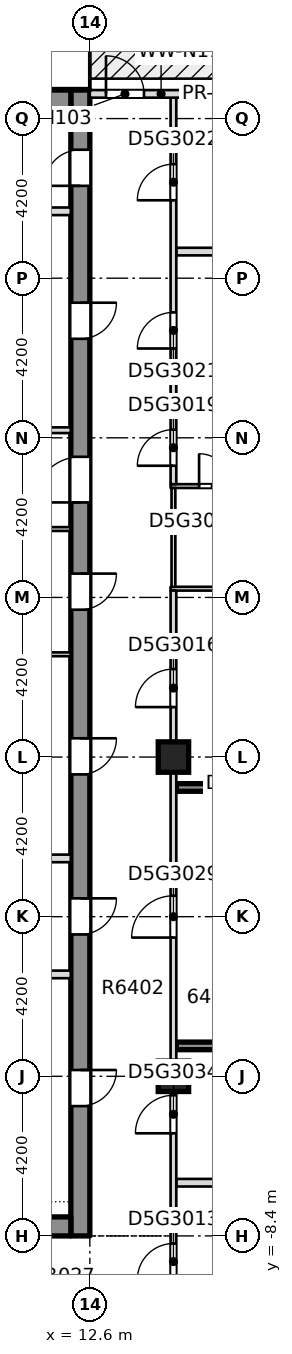
"""IFC4 building model, lengths in metres.
Left out: names, types, materials, properties, quantities, classifications, styles, units other than length and angle.
Written with IfcOpenShell. Run it as: python <this file> out.ifc"""

import sys

from ifc_helpers import new_model, si_unit, direction, frame, frame_2d, origin, origin_2d, place, context, subcontext, project, spatial, rectangle, extrude, element, fill, save


model = new_model("IFC4")
c1 = context("Model", 3, precision=1e-05, world=origin(), true_north=direction((0.0, 1.0)))
c2 = subcontext(c1, "Body", "Model", "MODEL_VIEW")
j1 = project(units=[si_unit("LENGTHUNIT", "METRE"), si_unit("PLANEANGLEUNIT", "RADIAN")], contexts=[c1])
p1 = place(None, origin())
s1 = spatial("IfcSite", under=j1, at=p1, CompositionType="ELEMENT")
p2 = place(p1, origin())
s2 = spatial("IfcBuilding", under=s1, at=p2, CompositionType="ELEMENT")
p3 = place(p2, frame((0.0, 0.0, 244.15)))
s3 = spatial("IfcBuildingStorey", under=s2, at=p3, CompositionType="ELEMENT", Elevation=244.15)
p4 = place(p3, frame((12.35, -8.4, -0.4), z_axis=(0.0, 0.0, 1.0), x_axis=(0.0, 1.0, 0.0)))
e1 = element("IfcWall", 1, at=p4, inside=s3, PredefinedType="SHEAR", context=c2, shape_type="SweptSolid", body=[
    extrude(rectangle(XDim=30.15, YDim=0.5, at=frame_2d((15.075, 0.0))), origin(), (0.0, 0.0, 1.0), 3.45),
])
p5 = place(p4, frame((3.416, 0.0, 0.4)))
e2 = element("IfcOpeningElement", 2, at=p5, cuts=e1, PredefinedType="OPENING", context=c2, shape_type="SweptSolid", body=[
    extrude(rectangle(XDim=0.95, YDim=2.1, at=frame_2d((0.475, 1.05))), frame((0.0, 0.26, 0.0), z_axis=(0.0, -1.0, 0.0), x_axis=(1.0, 0.0, 0.0)), (0.0, 0.0, 1.0), 0.52),
])
p6 = place(p4, frame((7.932, 0.0, 0.4)))
e3 = element("IfcOpeningElement", 3, at=p6, cuts=e1, PredefinedType="OPENING", context=c2, shape_type="SweptSolid", body=[
    extrude(rectangle(XDim=0.95, YDim=2.1, at=frame_2d((0.475, 1.05))), frame((0.0, 0.26, 0.0), z_axis=(0.0, -1.0, 0.0), x_axis=(1.0, 0.0, 0.0)), (0.0, 0.0, 1.0), 0.52),
])
p7 = place(p4, frame((12.144, 0.0, 0.4)))
e4 = element("IfcOpeningElement", 4, at=p7, cuts=e1, PredefinedType="OPENING", context=c2, shape_type="SweptSolid", body=[
    extrude(rectangle(XDim=0.95, YDim=2.1, at=frame_2d((0.475, 1.05))), frame((0.0, 0.26, 0.0), z_axis=(0.0, -1.0, 0.0), x_axis=(1.0, 0.0, 0.0)), (0.0, 0.0, 1.0), 0.52),
])
p8 = place(p4, frame((16.477, 0.0, 0.4)))
e5 = element("IfcOpeningElement", 5, at=p8, cuts=e1, PredefinedType="OPENING", context=c2, shape_type="SweptSolid", body=[
    extrude(rectangle(XDim=0.95, YDim=2.1, at=frame_2d((0.475, 1.05))), frame((0.0, 0.26, 0.0), z_axis=(0.0, -1.0, 0.0), x_axis=(1.0, 0.0, 0.0)), (0.0, 0.0, 1.0), 0.52),
])
p9 = place(p4, frame((23.605, 0.0, 0.4)))
e6 = element("IfcOpeningElement", 6, at=p9, cuts=e1, PredefinedType="OPENING", context=c2, shape_type="SweptSolid", body=[
    extrude(rectangle(XDim=0.95, YDim=2.1, at=frame_2d((0.475, 1.05))), frame((0.0, 0.26, 0.0), z_axis=(0.0, -1.0, 0.0), x_axis=(1.0, 0.0, 0.0)), (0.0, 0.0, 1.0), 0.52),
])
p10 = place(p4, frame((27.63, 0.0, 0.4)))
e7 = element("IfcOpeningElement", 7, at=p10, cuts=e1, PredefinedType="OPENING", context=c2, shape_type="SweptSolid", body=[
    extrude(rectangle(XDim=0.95, YDim=2.1, at=frame_2d((0.475, 1.05))), frame((0.0, 0.26, 0.0), z_axis=(0.0, -1.0, 0.0), x_axis=(1.0, 0.0, 0.0)), (0.0, 0.0, 1.0), 0.52),
])
p11 = place(p4, frame((19.3, 0.0, 0.4)))
e8 = element("IfcOpeningElement", 8, at=p11, cuts=e1, PredefinedType="OPENING", context=c2, shape_type="SweptSolid", body=[
    extrude(rectangle(XDim=1.2, YDim=2.1, at=frame_2d((0.6, 1.05))), frame((0.0, 0.26, 0.0), z_axis=(0.0, -1.0, 0.0), x_axis=(1.0, 0.0, 0.0)), (0.0, 0.0, 1.0), 0.52),
])
p12 = place(p3, frame((-12.1, -8.15, -0.4), z_axis=(0.0, 0.0, 1.0), x_axis=(1.0, 0.0, 0.0)))
e9 = element("IfcWall", 9, at=p12, inside=s3, PredefinedType="SHEAR", context=c2, shape_type="SweptSolid", body=[
    extrude(rectangle(XDim=24.2, YDim=0.5, at=frame_2d((12.1, 0.0))), origin(), (0.0, 0.0, 1.0), 3.45),
])
p13 = place(p12, frame((7.35, 0.0, 0.4)))
e10 = element("IfcOpeningElement", 10, at=p13, cuts=e9, PredefinedType="OPENING", context=c2, shape_type="SweptSolid", body=[
    extrude(rectangle(XDim=1.8, YDim=2.1, at=frame_2d((0.9, 1.05))), frame((0.0, 0.26, 0.0), z_axis=(0.0, -1.0, 0.0), x_axis=(1.0, 0.0, 0.0)), (0.0, 0.0, 1.0), 0.52),
])
p14 = place(p12, frame((15.05, 0.0, 0.4)))
e11 = element("IfcOpeningElement", 11, at=p14, cuts=e9, PredefinedType="OPENING", context=c2, shape_type="SweptSolid", body=[
    extrude(rectangle(XDim=1.8, YDim=2.1, at=frame_2d((0.9, 1.05))), frame((0.0, 0.26, 0.0), z_axis=(0.0, -1.0, 0.0), x_axis=(1.0, 0.0, 0.0)), (0.0, 0.0, 1.0), 0.52),
])
p15 = place(p3, frame((-12.1, 21.5, -0.4), z_axis=(0.0, 0.0, 1.0), x_axis=(1.0, 0.0, 0.0)))
e12 = element("IfcWall", 12, at=p15, inside=s3, PredefinedType="SHEAR", context=c2, shape_type="SweptSolid", body=[
    extrude(rectangle(XDim=24.2, YDim=0.5, at=frame_2d((12.1, 0.0))), origin(), (0.0, 0.0, 1.0), 3.45),
])
for number, where, z_axis, x_axis in (
    (13, (14.8, -4.2, -0.4), (0.0, 0.0, 1.0), (1.0, 0.0, 0.0)),
    (14, (14.8, 4.2, -0.4), (0.0, 0.0, 1.0), (1.0, 0.0, 0.0)),
):
    element("IfcColumn", number, at=place(p3, frame(where, z_axis=z_axis, x_axis=x_axis)), inside=s3, PredefinedType="COLUMN", context=c2, shape_type="SweptSolid", body=[
        extrude(rectangle(XDim=0.8, YDim=0.8, at=origin_2d()), origin(), (0.0, 0.0, 1.0), 3.45),
    ])
p16 = place(p3, frame((14.875, -7.0, 0.0), z_axis=(0.0, 0.0, 1.0), x_axis=(1.0, 0.0, 0.0)))
e15 = element("IfcWall", 15, at=p16, inside=s3, PredefinedType="PARTITIONING", context=c2, shape_type="SweptSolid", body=[
    extrude(rectangle(XDim=10.875, YDim=0.2, at=frame_2d((5.438, 0.0))), origin(), (0.0, 0.0, 1.0), 3.05),
])
p17 = place(p3, frame((14.875, -3.4, 0.0), z_axis=(0.0, 0.0, 1.0), x_axis=(1.0, 0.0, 0.0)))
e16 = element("IfcWall", 16, at=p17, inside=s3, PredefinedType="SOLIDWALL", context=c2, shape_type="SweptSolid", body=[
    extrude(rectangle(XDim=5.525, YDim=0.2, at=frame_2d((2.762, 0.0))), origin(), (0.0, 0.0, 1.0), 3.05),
])
p18 = place(p3, frame((14.875, 3.4, 0.0), z_axis=(0.0, 0.0, 1.0), x_axis=(1.0, 0.0, 0.0)))
e17 = element("IfcWall", 17, at=p18, inside=s3, PredefinedType="SOLIDWALL", context=c2, shape_type="SweptSolid", body=[
    extrude(rectangle(XDim=5.575, YDim=0.2, at=frame_2d((2.788, 0.0))), origin(), (0.0, 0.0, 1.0), 3.05),
])
p19 = place(p3, frame((14.725, 8.63, 0.0), z_axis=(0.0, 0.0, 1.0), x_axis=(1.0, 0.0, 0.0)))
e18 = element("IfcWall", 18, at=p19, inside=s3, PredefinedType="PARTITIONING", context=c2, shape_type="SweptSolid", body=[
    extrude(rectangle(XDim=2.825, YDim=0.1, at=frame_2d((1.413, 0.0))), origin(), (0.0, 0.0, 1.0), 3.05),
])
p20 = place(p3, frame((14.725, 11.33, 0.0), z_axis=(0.0, 0.0, 1.0), x_axis=(1.0, 0.0, 0.0)))
e19 = element("IfcWall", 19, at=p20, inside=s3, PredefinedType="PARTITIONING", context=c2, shape_type="SweptSolid", body=[
    extrude(rectangle(XDim=2.825, YDim=0.1, at=frame_2d((1.413, 0.0))), origin(), (0.0, 0.0, 1.0), 3.05),
])
p21 = place(p20, frame((0.75, 0.0, 0.0)))
e20 = element("IfcOpeningElement", 20, at=p21, cuts=e19, PredefinedType="OPENING", context=c2, shape_type="SweptSolid", body=[
    extrude(rectangle(XDim=0.85, YDim=2.1, at=frame_2d((0.425, 1.05))), frame((0.0, 0.06, 0.0), z_axis=(0.0, -1.0, 0.0), x_axis=(1.0, 0.0, 0.0)), (0.0, 0.0, 1.0), 0.12),
])
for number, where, z_axis, x_axis in (
    (21, (14.875, 13.35, 0.0), (0.0, 0.0, 1.0), (1.0, 0.0, 0.0)),
    (22, (14.875, 17.5, 0.0), (0.0, 0.0, 1.0), (1.0, 0.0, 0.0)),
):
    element("IfcWall", number, at=place(p3, frame(where, z_axis=z_axis, x_axis=x_axis)), inside=s3, PredefinedType="PARTITIONING", context=c2, shape_type="SweptSolid", body=[
        extrude(rectangle(XDim=2.475, YDim=0.2, at=frame_2d((1.238, 0.0))), origin(), (0.0, 0.0, 1.0), 3.05),
    ])
p22 = place(p3, frame((14.8, -10.45, 0.0), z_axis=(0.0, 0.0, 1.0), x_axis=(0.0, 1.0, 0.0)))
e23 = element("IfcWall", 23, at=p22, inside=s3, PredefinedType="PARTITIONING", context=c2, shape_type="SweptSolid", body=[
    extrude(rectangle(XDim=19.03, YDim=0.15, at=frame_2d((9.515, 0.0))), origin(), (0.0, 0.0, 1.0), 3.05),
])
p23 = place(p22, frame((0.9, 0.0, 0.0)))
e24 = element("IfcOpeningElement", 24, at=p23, cuts=e23, PredefinedType="OPENING", context=c2, shape_type="SweptSolid", body=[
    extrude(rectangle(XDim=0.95, YDim=2.1, at=frame_2d((0.475, 1.05))), frame((0.0, 0.085, 0.0), z_axis=(0.0, -1.0, 0.0), x_axis=(1.0, 0.0, 0.0)), (0.0, 0.0, 1.0), 0.17),
])
p24 = place(p22, frame((15.965, 0.0, 0.0)))
e25 = element("IfcOpeningElement", 25, at=p24, cuts=e23, PredefinedType="OPENING", context=c2, shape_type="SweptSolid", body=[
    extrude(rectangle(XDim=1.0, YDim=2.1, at=frame_2d((0.5, 1.05))), frame((0.0, 0.085, 0.0), z_axis=(0.0, -1.0, 0.0), x_axis=(1.0, 0.0, 0.0)), (0.0, 0.0, 1.0), 0.17),
])
p25 = place(p22, frame((9.9, 0.0, 0.0)))
e26 = element("IfcOpeningElement", 26, at=p25, cuts=e23, PredefinedType="OPENING", context=c2, shape_type="SweptSolid", body=[
    extrude(rectangle(XDim=1.1, YDim=2.1, at=frame_2d((0.55, 1.05))), frame((0.0, 0.085, 0.0), z_axis=(0.0, -1.0, 0.0), x_axis=(1.0, 0.0, 0.0)), (0.0, 0.0, 1.0), 0.17),
])
p26 = place(p22, frame((4.75, 0.0, 0.0)))
e27 = element("IfcOpeningElement", 27, at=p26, cuts=e23, PredefinedType="OPENING", context=c2, shape_type="SweptSolid", body=[
    extrude(rectangle(XDim=1.0, YDim=2.1, at=frame_2d((0.5, 1.05))), frame((0.0, 0.085, 0.0), z_axis=(0.0, -1.0, 0.0), x_axis=(1.0, 0.0, 0.0)), (0.0, 0.0, 1.0), 0.17),
])
p27 = place(p3, frame((14.8, 8.68, 0.0), z_axis=(0.0, 0.0, 1.0), x_axis=(0.0, 1.0, 0.0)))
e28 = element("IfcWall", 28, at=p27, inside=s3, PredefinedType="PARTITIONING", context=c2, shape_type="SweptSolid", body=[
    extrude(rectangle(XDim=2.6, YDim=0.1, at=frame_2d((1.3, 0.0))), origin(), (0.0, 0.0, 1.0), 3.05),
])
p28 = place(p3, frame((14.8, 11.38, 0.0), z_axis=(0.0, 0.0, 1.0), x_axis=(0.0, 1.0, 0.0)))
e29 = element("IfcWall", 29, at=p28, inside=s3, PredefinedType="PARTITIONING", context=c2, shape_type="SweptSolid", body=[
    extrude(rectangle(XDim=10.17, YDim=0.15, at=frame_2d((5.085, 0.0))), origin(), (0.0, 0.0, 1.0), 3.05),
])
p29 = place(p28, frame((0.485, 0.0, 0.0)))
e30 = element("IfcOpeningElement", 30, at=p29, cuts=e29, PredefinedType="OPENING", context=c2, shape_type="SweptSolid", body=[
    extrude(rectangle(XDim=0.95, YDim=2.1, at=frame_2d((0.475, 1.05))), frame((0.0, 0.085, 0.0), z_axis=(0.0, -1.0, 0.0), x_axis=(1.0, 0.0, 0.0)), (0.0, 0.0, 1.0), 0.17),
])
p30 = place(p28, frame((3.57, 0.0, 0.0)))
e31 = element("IfcOpeningElement", 31, at=p30, cuts=e29, PredefinedType="OPENING", context=c2, shape_type="SweptSolid", body=[
    extrude(rectangle(XDim=0.95, YDim=2.1, at=frame_2d((0.475, 1.05))), frame((0.0, 0.085, 0.0), z_axis=(0.0, -1.0, 0.0), x_axis=(1.0, 0.0, 0.0)), (0.0, 0.0, 1.0), 0.17),
])
p31 = place(p28, frame((7.47, 0.0, 0.0)))
e32 = element("IfcOpeningElement", 32, at=p31, cuts=e29, PredefinedType="OPENING", context=c2, shape_type="SweptSolid", body=[
    extrude(rectangle(XDim=0.95, YDim=2.1, at=frame_2d((0.475, 1.05))), frame((0.0, 0.085, 0.0), z_axis=(0.0, -1.0, 0.0), x_axis=(1.0, 0.0, 0.0)), (0.0, 0.0, 1.0), 0.17),
])
p32 = place(p3, frame((16.35, 21.65, 0.0), z_axis=(0.0, 0.0, 1.0), x_axis=(-1.0, 0.0, 0.0)))
e33 = element("IfcWall", 33, at=p32, inside=s3, PredefinedType="STANDARD", context=c2, shape_type="SweptSolid", body=[
    extrude(rectangle(XDim=3.75, YDim=0.2, at=frame_2d((1.875, 0.0))), origin(), (0.0, 0.0, 1.0), 3.05),
])
p33 = place(p32, frame((2.325, 0.0, 0.0)))
e34 = element("IfcOpeningElement", 34, at=p33, cuts=e33, PredefinedType="OPENING", context=c2, shape_type="SweptSolid", body=[
    extrude(rectangle(XDim=1.0, YDim=2.4, at=frame_2d((0.5, 1.2))), frame((0.0, 0.11, 0.0), z_axis=(0.0, -1.0, 0.0), x_axis=(1.0, 0.0, 0.0)), (0.0, 0.0, 1.0), 0.22),
])
for number, where, z_axis, x_axis in (
    (35, (8.651, -1.519, 0.0), (0.0, 0.0, 1.0), (1.0, 0.0, 0.0)),
    (36, (8.651, 1.533, 0.0), (0.0, 0.0, 1.0), (1.0, 0.0, 0.0)),
):
    element("IfcWall", number, at=place(p3, frame(where, z_axis=z_axis, x_axis=x_axis)), inside=s3, PredefinedType="PARTITIONING", context=c2, shape_type="SweptSolid", body=[
        extrude(rectangle(XDim=3.448, YDim=0.2, at=frame_2d((1.724, 0.0))), origin(), (0.0, 0.0, 1.0), 3.05),
    ])
for number, where, z_axis, x_axis in (
    (37, (8.651, 6.904, 0.0), (0.0, 0.0, 1.0), (1.0, 0.0, 0.0)),
    (38, (8.651, 10.2, 0.0), (0.0, 0.0, 1.0), (1.0, 0.0, 0.0)),
):
    element("IfcWall", number, at=place(p3, frame(where, z_axis=z_axis, x_axis=x_axis)), inside=s3, PredefinedType="PARTITIONING", context=c2, shape_type="SweptSolid", body=[
        extrude(rectangle(XDim=3.448, YDim=0.1, at=frame_2d((1.724, 0.0))), origin(), (0.0, 0.0, 1.0), 3.05),
    ])
p34 = place(p3, frame((8.651, 12.8, 0.0), z_axis=(0.0, 0.0, 1.0), x_axis=(1.0, 0.0, 0.0)))
e39 = element("IfcWall", 39, at=p34, inside=s3, PredefinedType="PARTITIONING", context=c2, shape_type="SweptSolid", body=[
    extrude(rectangle(XDim=3.448, YDim=0.15, at=frame_2d((1.724, 0.0))), origin(), (0.0, 0.0, 1.0), 3.05),
])
p35 = place(p3, frame((8.651, 18.56, 0.0), z_axis=(0.0, 0.0, 1.0), x_axis=(1.0, 0.0, 0.0)))
e40 = element("IfcWall", 40, at=p35, inside=s3, PredefinedType="PARTITIONING", context=c2, shape_type="SweptSolid", body=[
    extrude(rectangle(XDim=3.448, YDim=0.2, at=frame_2d((1.724, 0.0))), origin(), (0.0, 0.0, 1.0), 3.05),
])
p36 = place(p23, origin())
e41 = element("IfcDoor", 41, at=p36, inside=s3, OperationType="SINGLE_SWING_RIGHT", PredefinedType="DOOR", context=c2, shape_type="SweptSolid", body=[
    extrude(rectangle(XDim=0.95, YDim=2.1, at=frame_2d((0.475, 1.05))), frame((0.0, 0.025, 0.0), z_axis=(0.0, -1.0, 0.0), x_axis=(1.0, 0.0, 0.0)), (0.0, 0.0, 1.0), 0.05),
])
fill(e24, e41)
p37 = place(p24, origin())
e42 = element("IfcDoor", 42, at=p37, inside=s3, OperationType="SINGLE_SWING_LEFT", PredefinedType="DOOR", context=c2, shape_type="SweptSolid", body=[
    extrude(rectangle(XDim=1.0, YDim=2.1, at=frame_2d((0.5, 1.05))), frame((0.0, 0.025, 0.0), z_axis=(0.0, -1.0, 0.0), x_axis=(1.0, 0.0, 0.0)), (0.0, 0.0, 1.0), 0.05),
])
fill(e25, e42)
p38 = place(p29, origin())
e43 = element("IfcDoor", 43, at=p38, inside=s3, OperationType="SINGLE_SWING_RIGHT", PredefinedType="DOOR", context=c2, shape_type="SweptSolid", body=[
    extrude(rectangle(XDim=0.95, YDim=2.1, at=frame_2d((0.475, 1.05))), frame((0.0, 0.025, 0.0), z_axis=(0.0, -1.0, 0.0), x_axis=(1.0, 0.0, 0.0)), (0.0, 0.0, 1.0), 0.05),
])
fill(e30, e43)
p39 = place(p21, origin())
e44 = element("IfcDoor", 44, at=p39, inside=s3, OperationType="SINGLE_SWING_RIGHT", PredefinedType="DOOR", context=c2, shape_type="SweptSolid", body=[
    extrude(rectangle(XDim=0.85, YDim=2.1, at=frame_2d((0.425, 1.05))), frame((0.0, 0.025, 0.0), z_axis=(0.0, -1.0, 0.0), x_axis=(1.0, 0.0, 0.0)), (0.0, 0.0, 1.0), 0.05),
])
fill(e20, e44)
p40 = place(p30, origin())
e45 = element("IfcDoor", 45, at=p40, inside=s3, OperationType="SINGLE_SWING_RIGHT", PredefinedType="DOOR", context=c2, shape_type="SweptSolid", body=[
    extrude(rectangle(XDim=0.95, YDim=2.1, at=frame_2d((0.475, 1.05))), frame((0.0, 0.025, 0.0), z_axis=(0.0, -1.0, 0.0), x_axis=(1.0, 0.0, 0.0)), (0.0, 0.0, 1.0), 0.05),
])
fill(e31, e45)
p41 = place(p31, origin())
e46 = element("IfcDoor", 46, at=p41, inside=s3, OperationType="SINGLE_SWING_RIGHT", PredefinedType="DOOR", context=c2, shape_type="SweptSolid", body=[
    extrude(rectangle(XDim=0.95, YDim=2.1, at=frame_2d((0.475, 1.05))), frame((0.0, 0.025, 0.0), z_axis=(0.0, -1.0, 0.0), x_axis=(1.0, 0.0, 0.0)), (0.0, 0.0, 1.0), 0.05),
])
fill(e32, e46)
p42 = place(p25, origin())
e47 = element("IfcDoor", 47, at=p42, inside=s3, OperationType="SINGLE_SWING_LEFT", PredefinedType="DOOR", context=c2, shape_type="SweptSolid", body=[
    extrude(rectangle(XDim=1.1, YDim=2.1, at=frame_2d((0.55, 1.05))), frame((0.0, 0.025, 0.0), z_axis=(0.0, -1.0, 0.0), x_axis=(1.0, 0.0, 0.0)), (0.0, 0.0, 1.0), 0.05),
])
fill(e26, e47)
p43 = place(p26, origin())
e48 = element("IfcDoor", 48, at=p43, inside=s3, OperationType="SINGLE_SWING_RIGHT", PredefinedType="DOOR", context=c2, shape_type="SweptSolid", body=[
    extrude(rectangle(XDim=1.0, YDim=2.1, at=frame_2d((0.5, 1.05))), frame((0.0, 0.025, 0.0), z_axis=(0.0, -1.0, 0.0), x_axis=(1.0, 0.0, 0.0)), (0.0, 0.0, 1.0), 0.05),
])
fill(e27, e48)
p44 = place(p33, origin())
e49 = element("IfcDoor", 49, at=p44, inside=s3, OperationType="SINGLE_SWING_LEFT", PredefinedType="DOOR", context=c2, shape_type="SweptSolid", body=[
    extrude(rectangle(XDim=1.0, YDim=2.4, at=frame_2d((0.5, 1.2))), frame((0.0, 0.025, 0.0), z_axis=(0.0, -1.0, 0.0), x_axis=(1.0, 0.0, 0.0)), (0.0, 0.0, 1.0), 0.05),
])
fill(e34, e49)
p45 = place(p5, origin())
e50 = element("IfcDoor", 50, at=p45, inside=s3, OperationType="SINGLE_SWING_LEFT", PredefinedType="DOOR", context=c2, shape_type="SweptSolid", body=[
    extrude(rectangle(XDim=0.95, YDim=2.1, at=frame_2d((0.475, 1.05))), frame((0.0, 0.025, 0.0), z_axis=(0.0, -1.0, 0.0), x_axis=(1.0, 0.0, 0.0)), (0.0, 0.0, 1.0), 0.05),
])
fill(e2, e50)
p46 = place(p6, origin())
e51 = element("IfcDoor", 51, at=p46, inside=s3, OperationType="SINGLE_SWING_LEFT", PredefinedType="DOOR", context=c2, shape_type="SweptSolid", body=[
    extrude(rectangle(XDim=0.95, YDim=2.1, at=frame_2d((0.475, 1.05))), frame((0.0, 0.025, 0.0), z_axis=(0.0, -1.0, 0.0), x_axis=(1.0, 0.0, 0.0)), (0.0, 0.0, 1.0), 0.05),
])
fill(e3, e51)
p47 = place(p7, origin())
e52 = element("IfcDoor", 52, at=p47, inside=s3, OperationType="SINGLE_SWING_LEFT", PredefinedType="DOOR", context=c2, shape_type="SweptSolid", body=[
    extrude(rectangle(XDim=0.95, YDim=2.1, at=frame_2d((0.475, 1.05))), frame((0.0, 0.025, 0.0), z_axis=(0.0, -1.0, 0.0), x_axis=(1.0, 0.0, 0.0)), (0.0, 0.0, 1.0), 0.05),
])
fill(e4, e52)
p48 = place(p8, origin())
e53 = element("IfcDoor", 53, at=p48, inside=s3, OperationType="SINGLE_SWING_LEFT", PredefinedType="DOOR", context=c2, shape_type="SweptSolid", body=[
    extrude(rectangle(XDim=0.95, YDim=2.1, at=frame_2d((0.475, 1.05))), frame((0.0, 0.025, 0.0), z_axis=(0.0, -1.0, 0.0), x_axis=(1.0, 0.0, 0.0)), (0.0, 0.0, 1.0), 0.05),
])
fill(e5, e53)
p49 = place(p9, origin())
e54 = element("IfcDoor", 54, at=p49, inside=s3, OperationType="SINGLE_SWING_LEFT", PredefinedType="DOOR", context=c2, shape_type="SweptSolid", body=[
    extrude(rectangle(XDim=0.95, YDim=2.1, at=frame_2d((0.475, 1.05))), frame((0.0, 0.025, 0.0), z_axis=(0.0, -1.0, 0.0), x_axis=(1.0, 0.0, 0.0)), (0.0, 0.0, 1.0), 0.05),
])
fill(e6, e54)
p50 = place(p10, origin())
e55 = element("IfcDoor", 55, at=p50, inside=s3, OperationType="SINGLE_SWING_LEFT", PredefinedType="DOOR", context=c2, shape_type="SweptSolid", body=[
    extrude(rectangle(XDim=0.95, YDim=2.1, at=frame_2d((0.475, 1.05))), frame((0.0, 0.025, 0.0), z_axis=(0.0, -1.0, 0.0), x_axis=(1.0, 0.0, 0.0)), (0.0, 0.0, 1.0), 0.05),
])
fill(e7, e55)
p51 = place(p11, origin())
e56 = element("IfcDoor", 56, at=p51, inside=s3, OperationType="SINGLE_SWING_LEFT", PredefinedType="DOOR", context=c2, shape_type="SweptSolid", body=[
    extrude(rectangle(XDim=1.2, YDim=2.1, at=frame_2d((0.6, 1.05))), frame((0.0, 0.025, 0.0), z_axis=(0.0, -1.0, 0.0), x_axis=(1.0, 0.0, 0.0)), (0.0, 0.0, 1.0), 0.05),
])
fill(e8, e56)
save(model, sys.argv[1])
